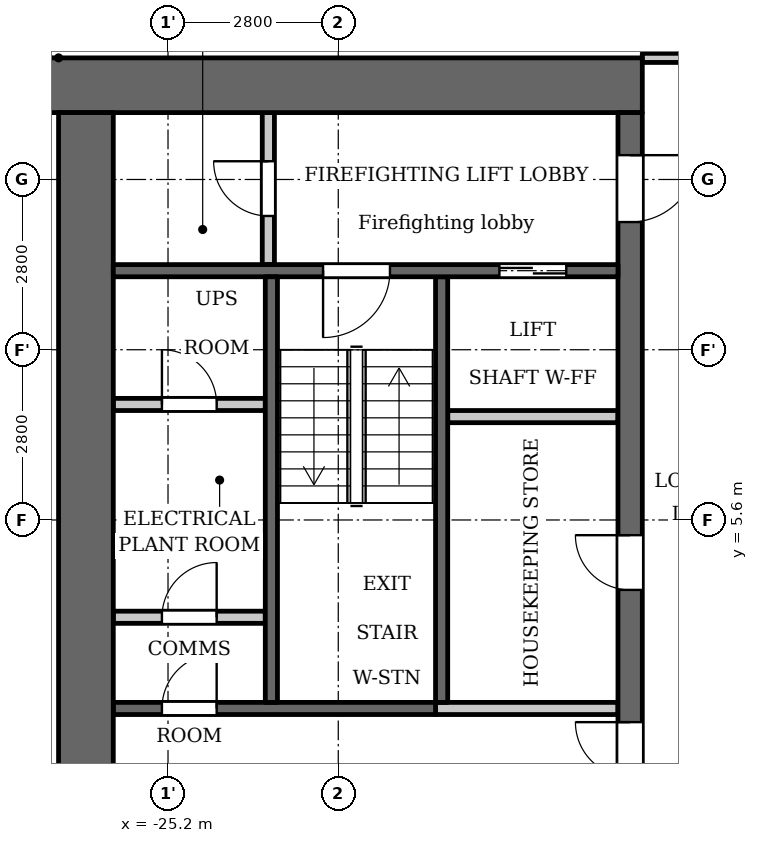
"""IFC4 building model, lengths in metres.
Left out: names, types, materials, properties, quantities, classifications, styles, units other than length and angle.
Written with IfcOpenShell. Run it as: python <this file> out.ifc"""

import sys

from ifc_helpers import new_model, si_unit, direction, frame, frame_2d, origin, place, context, subcontext, project, spatial, rectangle, extrude, element, fill, save


model = new_model("IFC4")
c1 = context("Model", 3, precision=1e-05, world=origin(), true_north=direction((0.0, 1.0)))
c2 = subcontext(c1, "Body", "Model", "MODEL_VIEW")
j1 = project(units=[si_unit("LENGTHUNIT", "METRE"), si_unit("PLANEANGLEUNIT", "RADIAN")], contexts=[c1])
p1 = place(None, origin())
s1 = spatial("IfcSite", under=j1, at=p1, CompositionType="ELEMENT")
p2 = place(p1, origin())
s2 = spatial("IfcBuilding", under=s1, at=p2, CompositionType="ELEMENT")
p3 = place(p2, frame((0.0, 0.0, 114.8)))
s3 = spatial("IfcBuildingStorey", under=s2, at=p3, CompositionType="ELEMENT", Elevation=114.8)
p4 = place(p3, frame((-20.7, 2.6, 0.0), z_axis=(0.0, 0.0, 1.0), x_axis=(0.0, 1.0, 0.0)))
e1 = element("IfcWall", 1, at=p4, inside=s3, PredefinedType="SHEAR", context=c2, shape_type="SweptSolid", body=[
    extrude(rectangle(XDim=7.0, YDim=0.2, at=frame_2d((3.5, 0.0))), origin(), (0.0, 0.0, 1.0), 3.2),
])
p5 = place(p3, frame((-20.8, 2.5, 0.0), z_axis=(0.0, 0.0, 1.0), x_axis=(-1.0, 0.0, 0.0)))
e2 = element("IfcWall", 2, at=p5, inside=s3, PredefinedType="SHEAR", context=c2, shape_type="SweptSolid", body=[
    extrude(rectangle(XDim=5.3, YDim=0.2, at=frame_2d((2.65, 0.0))), origin(), (0.0, 0.0, 1.0), 3.2),
])
p6 = place(p5, frame((3.6, 0.0, 0.0)))
e3 = element("IfcOpeningElement", 3, at=p6, cuts=e2, PredefinedType="OPENING", context=c2, shape_type="SweptSolid", body=[
    extrude(rectangle(XDim=0.9, YDim=2.1, at=frame_2d((0.45, 1.05))), frame((0.0, 0.11, 0.0), z_axis=(0.0, -1.0, 0.0), x_axis=(1.0, 0.0, 0.0)), (0.0, 0.0, 1.0), 0.22),
])
p7 = place(p3, frame((-17.4, 12.75, 0.0), z_axis=(0.0, 0.0, 1.0), x_axis=(-1.0, 0.0, 0.0)))
e4 = element("IfcWall", 4, at=p7, inside=s3, PredefinedType="SHEAR", context=c2, shape_type="SweptSolid", body=[
    extrude(rectangle(XDim=10.4, YDim=0.9, at=frame_2d((5.2, 0.0))), origin(), (0.0, 0.0, 1.0), 3.2),
])
p8 = place(p3, frame((-17.6, -12.3, 0.0), z_axis=(0.0, 0.0, 1.0), x_axis=(0.0, 1.0, 0.0)))
e5 = element("IfcWall", 5, at=p8, inside=s3, PredefinedType="SHEAR", context=c2, shape_type="SweptSolid", body=[
    extrude(rectangle(XDim=24.6, YDim=0.4, at=frame_2d((12.3, 0.0))), origin(), (0.0, 0.0, 1.0), 3.2),
])
p9 = place(p8, frame((6.0, 0.0, 0.0)))
e6 = element("IfcOpeningElement", 6, at=p9, cuts=e5, PredefinedType="OPENING", context=c2, shape_type="SweptSolid", body=[
    extrude(rectangle(XDim=1.1, YDim=2.1, at=frame_2d((0.55, 1.05))), frame((0.0, 0.21, 0.0), z_axis=(0.0, -1.0, 0.0), x_axis=(1.0, 0.0, 0.0)), (0.0, 0.0, 1.0), 0.42),
])
p10 = place(p8, frame((8.4, 0.0, 0.0)))
e7 = element("IfcOpeningElement", 7, at=p10, cuts=e5, PredefinedType="OPENING", context=c2, shape_type="SweptSolid", body=[
    extrude(rectangle(XDim=1.1, YDim=2.1, at=frame_2d((0.55, 1.05))), frame((0.0, 0.21, 0.0), z_axis=(0.0, -1.0, 0.0), x_axis=(1.0, 0.0, 0.0)), (0.0, 0.0, 1.0), 0.42),
])
p11 = place(p8, frame((10.8, 0.0, 0.0)))
e8 = element("IfcOpeningElement", 8, at=p11, cuts=e5, PredefinedType="OPENING", context=c2, shape_type="SweptSolid", body=[
    extrude(rectangle(XDim=1.1, YDim=2.1, at=frame_2d((0.55, 1.05))), frame((0.0, 0.21, 0.0), z_axis=(0.0, -1.0, 0.0), x_axis=(1.0, 0.0, 0.0)), (0.0, 0.0, 1.0), 0.42),
])
p12 = place(p8, frame((16.75, 0.0, 0.0)))
e9 = element("IfcOpeningElement", 9, at=p12, cuts=e5, PredefinedType="OPENING", context=c2, shape_type="SweptSolid", body=[
    extrude(rectangle(XDim=0.9, YDim=2.1, at=frame_2d((0.45, 1.05))), frame((0.0, 0.21, 0.0), z_axis=(0.0, -1.0, 0.0), x_axis=(1.0, 0.0, 0.0)), (0.0, 0.0, 1.0), 0.42),
])
p13 = place(p8, frame((22.8, 0.0, 0.0)))
e10 = element("IfcOpeningElement", 10, at=p13, cuts=e5, PredefinedType="OPENING", context=c2, shape_type="SweptSolid", body=[
    extrude(rectangle(XDim=1.1, YDim=2.1, at=frame_2d((0.55, 1.05))), frame((0.0, 0.21, 0.0), z_axis=(0.0, -1.0, 0.0), x_axis=(1.0, 0.0, 0.0)), (0.0, 0.0, 1.0), 0.42),
])
p14 = place(p8, frame((0.7, 0.0, 0.0)))
e11 = element("IfcOpeningElement", 11, at=p14, cuts=e5, PredefinedType="OPENING", context=c2, shape_type="SweptSolid", body=[
    extrude(rectangle(XDim=1.1, YDim=2.1, at=frame_2d((0.55, 1.05))), frame((0.0, 0.21, 0.0), z_axis=(0.0, -1.0, 0.0), x_axis=(1.0, 0.0, 0.0)), (0.0, 0.0, 1.0), 0.42),
])
p15 = place(p8, frame((12.775, 0.0, 0.0)))
e12 = element("IfcOpeningElement", 12, at=p15, cuts=e5, PredefinedType="OPENING", context=c2, shape_type="SweptSolid", body=[
    extrude(rectangle(XDim=1.8, YDim=2.1, at=frame_2d((0.9, 1.05))), frame((0.0, 0.21, 0.0), z_axis=(0.0, -1.0, 0.0), x_axis=(1.0, 0.0, 0.0)), (0.0, 0.0, 1.0), 0.42),
])
p16 = place(p3, frame((-26.55, -12.3, 0.0), z_axis=(0.0, 0.0, 1.0), x_axis=(0.0, 1.0, 0.0)))
e13 = element("IfcWall", 13, at=p16, inside=s3, PredefinedType="SHEAR", context=c2, shape_type="SweptSolid", body=[
    extrude(rectangle(XDim=24.6, YDim=0.9, at=frame_2d((12.3, 0.0))), origin(), (0.0, 0.0, 1.0), 3.2),
])
p17 = place(p3, frame((-23.55, 9.8, 0.0), z_axis=(0.0, 0.0, 1.0), x_axis=(0.0, 1.0, 0.0)))
e14 = element("IfcWall", 14, at=p17, inside=s3, PredefinedType="PARTITIONING", context=c2, shape_type="SweptSolid", body=[
    extrude(rectangle(XDim=2.5, YDim=0.2, at=frame_2d((1.25, 0.0))), origin(), (0.0, 0.0, 1.0), 3.2),
])
p18 = place(p17, frame((0.8, 0.0, 0.0)))
e15 = element("IfcOpeningElement", 15, at=p18, cuts=e14, PredefinedType="OPENING", context=c2, shape_type="SweptSolid", body=[
    extrude(rectangle(XDim=0.9, YDim=2.1, at=frame_2d((0.45, 1.05))), frame((0.0, 0.11, 0.0), z_axis=(0.0, -1.0, 0.0), x_axis=(1.0, 0.0, 0.0)), (0.0, 0.0, 1.0), 0.22),
])
p19 = place(p3, frame((-23.6, 4.0, 0.0), z_axis=(0.0, 0.0, 1.0), x_axis=(-1.0, 0.0, 0.0)))
e16 = element("IfcWall", 16, at=p19, inside=s3, PredefinedType="PARTITIONING", context=c2, shape_type="SweptSolid", body=[
    extrude(rectangle(XDim=2.5, YDim=0.2, at=frame_2d((1.25, 0.0))), origin(), (0.0, 0.0, 1.0), 3.2),
])
p20 = place(p19, frame((0.8, 0.0, 0.0)))
e17 = element("IfcOpeningElement", 17, at=p20, cuts=e16, PredefinedType="OPENING", context=c2, shape_type="SweptSolid", body=[
    extrude(rectangle(XDim=0.9, YDim=2.1, at=frame_2d((0.45, 1.05))), frame((0.0, 0.11, 0.0), z_axis=(0.0, -1.0, 0.0), x_axis=(1.0, 0.0, 0.0)), (0.0, 0.0, 1.0), 0.22),
])
p21 = place(p3, frame((-23.6, 7.5, 0.0), z_axis=(0.0, 0.0, 1.0), x_axis=(-1.0, 0.0, 0.0)))
e18 = element("IfcWall", 18, at=p21, inside=s3, PredefinedType="PARTITIONING", context=c2, shape_type="SweptSolid", body=[
    extrude(rectangle(XDim=2.5, YDim=0.2, at=frame_2d((1.25, 0.0))), origin(), (0.0, 0.0, 1.0), 3.2),
])
p22 = place(p21, frame((0.8, 0.0, 0.0)))
e19 = element("IfcOpeningElement", 19, at=p22, cuts=e18, PredefinedType="OPENING", context=c2, shape_type="SweptSolid", body=[
    extrude(rectangle(XDim=0.9, YDim=2.1, at=frame_2d((0.45, 1.05))), frame((0.0, 0.11, 0.0), z_axis=(0.0, -1.0, 0.0), x_axis=(1.0, 0.0, 0.0)), (0.0, 0.0, 1.0), 0.22),
])
p23 = place(p3, frame((-17.8, 2.5, 0.0), z_axis=(0.0, 0.0, 1.0), x_axis=(-1.0, 0.0, 0.0)))
e20 = element("IfcWall", 20, at=p23, inside=s3, PredefinedType="PARTITIONING", context=c2, shape_type="SweptSolid", body=[
    extrude(rectangle(XDim=3.0, YDim=0.2, at=frame_2d((1.5, 0.0))), origin(), (0.0, 0.0, 1.0), 3.2),
])
p24 = place(p3, frame((-17.8, 7.3, 0.0), z_axis=(0.0, 0.0, 1.0), x_axis=(-1.0, 0.0, 0.0)))
e21 = element("IfcWall", 21, at=p24, inside=s3, PredefinedType="PARTITIONING", context=c2, shape_type="SweptSolid", body=[
    extrude(rectangle(XDim=2.8, YDim=0.2, at=frame_2d((1.4, 0.0))), origin(), (0.0, 0.0, 1.0), 3.2),
])
p25 = place(p3, frame((-17.8, 9.7, 0.0), z_axis=(0.0, 0.0, 1.0), x_axis=(-1.0, 0.0, 0.0)))
e22 = element("IfcWall", 22, at=p25, inside=s3, PredefinedType="SHEAR", context=c2, shape_type="SweptSolid", body=[
    extrude(rectangle(XDim=8.3, YDim=0.2, at=frame_2d((4.15, 0.0))), origin(), (0.0, 0.0, 1.0), 3.2),
])
p26 = place(p25, frame((0.85, 0.0, 0.0)))
e23 = element("IfcOpeningElement", 23, at=p26, cuts=e22, PredefinedType="OPENING", context=c2, shape_type="SweptSolid", body=[
    extrude(rectangle(XDim=1.1, YDim=2.1, at=frame_2d((0.55, 1.05))), frame((0.0, 0.11, 0.0), z_axis=(0.0, -1.0, 0.0), x_axis=(1.0, 0.0, 0.0)), (0.0, 0.0, 1.0), 0.22),
])
p27 = place(p25, frame((3.75, 0.0, 0.0)))
e24 = element("IfcOpeningElement", 24, at=p27, cuts=e22, PredefinedType="OPENING", context=c2, shape_type="SweptSolid", body=[
    extrude(rectangle(XDim=1.1, YDim=2.1, at=frame_2d((0.55, 1.05))), frame((0.0, 0.11, 0.0), z_axis=(0.0, -1.0, 0.0), x_axis=(1.0, 0.0, 0.0)), (0.0, 0.0, 1.0), 0.22),
])
p28 = place(p3, frame((-23.5, 2.6, 0.0), z_axis=(0.0, 0.0, 1.0), x_axis=(0.0, 1.0, 0.0)))
e25 = element("IfcWall", 25, at=p28, inside=s3, PredefinedType="SHEAR", context=c2, shape_type="SweptSolid", body=[
    extrude(rectangle(XDim=7.0, YDim=0.2, at=frame_2d((3.5, 0.0))), origin(), (0.0, 0.0, 1.0), 3.2),
])
p29 = place(p3, frame((-17.4, 13.2, 0.0), z_axis=(0.0, 0.0, 1.0), x_axis=(1.0, 0.0, 0.0)))
e26 = element("IfcWall", 26, at=p29, inside=s3, PredefinedType="PARTITIONING", context=c2, shape_type="SweptSolid", body=[
    extrude(rectangle(XDim=34.8, YDim=0.15, at=frame_2d((17.4, 0.0))), origin(), (0.0, 0.0, 1.0), 3.2),
])
p30 = place(p29, frame((0.75, 0.0, 0.0)))
e27 = element("IfcOpeningElement", 27, at=p30, cuts=e26, PredefinedType="OPENING", context=c2, shape_type="SweptSolid", body=[
    extrude(rectangle(XDim=1.0, YDim=2.1, at=frame_2d((0.5, 1.05))), frame((0.0, 0.085, 0.0), z_axis=(0.0, -1.0, 0.0), x_axis=(1.0, 0.0, 0.0)), (0.0, 0.0, 1.0), 0.17),
])
p31 = place(p29, frame((33.15, 0.0, 0.0)))
e28 = element("IfcOpeningElement", 28, at=p31, cuts=e26, PredefinedType="OPENING", context=c2, shape_type="SweptSolid", body=[
    extrude(rectangle(XDim=1.0, YDim=2.1, at=frame_2d((0.5, 1.05))), frame((0.0, 0.085, 0.0), z_axis=(0.0, -1.0, 0.0), x_axis=(1.0, 0.0, 0.0)), (0.0, 0.0, 1.0), 0.17),
])
p32 = place(p29, frame((6.85, 0.0, 0.0)))
e29 = element("IfcOpeningElement", 29, at=p32, cuts=e26, PredefinedType="OPENING", context=c2, shape_type="SweptSolid", body=[
    extrude(rectangle(XDim=1.0, YDim=2.1, at=frame_2d((0.5, 1.05))), frame((0.0, 0.085, 0.0), z_axis=(0.0, -1.0, 0.0), x_axis=(1.0, 0.0, 0.0)), (0.0, 0.0, 1.0), 0.17),
])
p33 = place(p29, frame((12.45, 0.0, 0.0)))
e30 = element("IfcOpeningElement", 30, at=p33, cuts=e26, PredefinedType="OPENING", context=c2, shape_type="SweptSolid", body=[
    extrude(rectangle(XDim=1.0, YDim=2.1, at=frame_2d((0.5, 1.05))), frame((0.0, 0.085, 0.0), z_axis=(0.0, -1.0, 0.0), x_axis=(1.0, 0.0, 0.0)), (0.0, 0.0, 1.0), 0.17),
])
p34 = place(p29, frame((29.25, 0.0, 0.0)))
e31 = element("IfcOpeningElement", 31, at=p34, cuts=e26, PredefinedType="OPENING", context=c2, shape_type="SweptSolid", body=[
    extrude(rectangle(XDim=1.0, YDim=2.1, at=frame_2d((0.5, 1.05))), frame((0.0, 0.085, 0.0), z_axis=(0.0, -1.0, 0.0), x_axis=(1.0, 0.0, 0.0)), (0.0, 0.0, 1.0), 0.17),
])
p35 = place(p12, origin())
e32 = element("IfcDoor", 32, at=p35, inside=s3, OperationType="SINGLE_SWING_LEFT", PredefinedType="DOOR", context=c2, shape_type="SweptSolid", body=[
    extrude(rectangle(XDim=0.9, YDim=2.1, at=frame_2d((0.45, 1.05))), frame((0.0, 0.025, 0.0), z_axis=(0.0, -1.0, 0.0), x_axis=(1.0, 0.0, 0.0)), (0.0, 0.0, 1.0), 0.05),
])
fill(e9, e32)
p36 = place(p26, origin())
e33 = element("IfcDoor", 33, at=p36, inside=s3, OperationType="DOUBLE_DOOR_SLIDING", PredefinedType="DOOR", context=c2, shape_type="SweptSolid", body=[
    extrude(rectangle(XDim=1.1, YDim=2.1, at=frame_2d((0.55, 1.05))), frame((0.0, 0.025, 0.0), z_axis=(0.0, -1.0, 0.0), x_axis=(1.0, 0.0, 0.0)), (0.0, 0.0, 1.0), 0.05),
])
fill(e23, e33)
p37 = place(p13, origin())
e34 = element("IfcDoor", 34, at=p37, inside=s3, OperationType="SINGLE_SWING_RIGHT", PredefinedType="DOOR", context=c2, shape_type="SweptSolid", body=[
    extrude(rectangle(XDim=1.1, YDim=2.1, at=frame_2d((0.55, 1.05))), frame((0.0, 0.025, 0.0), z_axis=(0.0, -1.0, 0.0), x_axis=(1.0, 0.0, 0.0)), (0.0, 0.0, 1.0), 0.05),
])
fill(e10, e34)
p38 = place(p18, origin())
e35 = element("IfcDoor", 35, at=p38, inside=s3, OperationType="SINGLE_SWING_LEFT", PredefinedType="DOOR", context=c2, shape_type="SweptSolid", body=[
    extrude(rectangle(XDim=0.9, YDim=2.1, at=frame_2d((0.45, 1.05))), frame((0.0, 0.025, 0.0), z_axis=(0.0, -1.0, 0.0), x_axis=(1.0, 0.0, 0.0)), (0.0, 0.0, 1.0), 0.05),
])
fill(e15, e35)
p39 = place(p27, origin())
e36 = element("IfcDoor", 36, at=p39, inside=s3, OperationType="SINGLE_SWING_LEFT", PredefinedType="DOOR", context=c2, shape_type="SweptSolid", body=[
    extrude(rectangle(XDim=1.1, YDim=2.1, at=frame_2d((0.55, 1.05))), frame((0.0, 0.025, 0.0), z_axis=(0.0, -1.0, 0.0), x_axis=(1.0, 0.0, 0.0)), (0.0, 0.0, 1.0), 0.05),
])
fill(e24, e36)
p40 = place(p15, origin())
e37 = element("IfcDoor", 37, at=p40, inside=s3, OperationType="DOUBLE_DOOR_SINGLE_SWING", PredefinedType="DOOR", context=c2, shape_type="SweptSolid", body=[
    extrude(rectangle(XDim=1.8, YDim=2.1, at=frame_2d((0.9, 1.05))), frame((0.0, 0.025, 0.0), z_axis=(0.0, -1.0, 0.0), x_axis=(1.0, 0.0, 0.0)), (0.0, 0.0, 1.0), 0.05),
])
fill(e12, e37)
p41 = place(p20, origin())
e38 = element("IfcDoor", 38, at=p41, inside=s3, OperationType="SINGLE_SWING_LEFT", PredefinedType="DOOR", context=c2, shape_type="SweptSolid", body=[
    extrude(rectangle(XDim=0.9, YDim=2.1, at=frame_2d((0.45, 1.05))), frame((0.0, 0.025, 0.0), z_axis=(0.0, -1.0, 0.0), x_axis=(1.0, 0.0, 0.0)), (0.0, 0.0, 1.0), 0.05),
])
fill(e17, e38)
p42 = place(p22, origin())
e39 = element("IfcDoor", 39, at=p42, inside=s3, OperationType="SINGLE_SWING_RIGHT", PredefinedType="DOOR", context=c2, shape_type="SweptSolid", body=[
    extrude(rectangle(XDim=0.9, YDim=2.1, at=frame_2d((0.45, 1.05))), frame((0.0, 0.025, 0.0), z_axis=(0.0, -1.0, 0.0), x_axis=(1.0, 0.0, 0.0)), (0.0, 0.0, 1.0), 0.05),
])
fill(e19, e39)
p43 = place(p6, origin())
e40 = element("IfcDoor", 40, at=p43, inside=s3, OperationType="SINGLE_SWING_LEFT", PredefinedType="DOOR", context=c2, shape_type="SweptSolid", body=[
    extrude(rectangle(XDim=0.9, YDim=2.1, at=frame_2d((0.45, 1.05))), frame((0.0, 0.025, 0.0), z_axis=(0.0, -1.0, 0.0), x_axis=(1.0, 0.0, 0.0)), (0.0, 0.0, 1.0), 0.05),
])
fill(e3, e40)
save(model, sys.argv[1])
